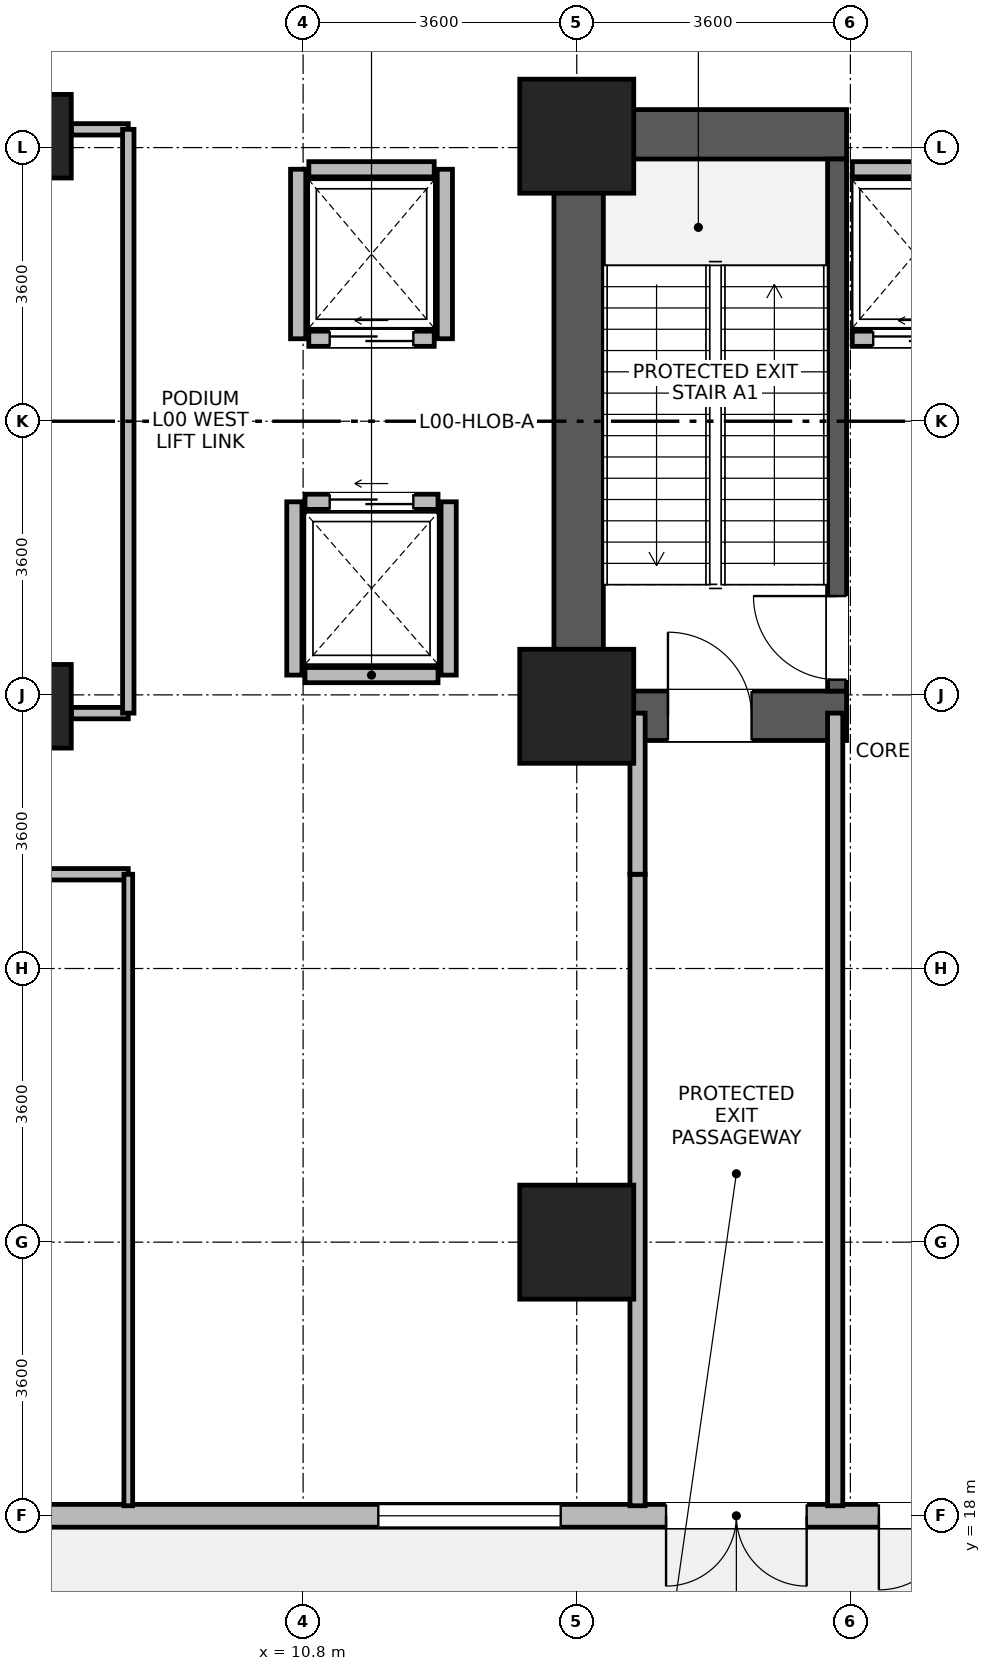
"""IFC4 building model, lengths in metres.
Left out: names, types, materials, properties, quantities, classifications, styles, units other than length and angle.
Written with IfcOpenShell. Run it as: python <this file> out.ifc"""

import sys

from ifc_helpers import new_model, si_unit, direction, frame, frame_2d, origin, origin_2d, place, context, subcontext, project, spatial, rectangle, circle, extrude, source, transform, mapped, element, fill, save


model = new_model("IFC4")
c1 = context("Model", 3, precision=1e-05, world=origin(), true_north=direction((0.0, 1.0)))
c2 = subcontext(c1, "Body", "Model", "MODEL_VIEW")
j1 = project(units=[si_unit("LENGTHUNIT", "METRE"), si_unit("PLANEANGLEUNIT", "RADIAN")], contexts=[c1])
p1 = place(None, origin())
s1 = spatial("IfcSite", under=j1, at=p1, CompositionType="ELEMENT")
p2 = place(p1, origin())
s2 = spatial("IfcBuilding", under=s1, at=p2, CompositionType="ELEMENT")
p3 = place(p2, origin())
s3 = spatial("IfcBuildingStorey", under=s2, at=p3, CompositionType="ELEMENT", Elevation=0.0)
p4 = place(p3, frame((14.425, 28.2, 0.0), z_axis=(0.0, 0.0, 1.0), x_axis=(0.0, 1.0, 0.0)))
e1 = element("IfcWall", 1, at=p4, inside=s3, PredefinedType="SHEAR", context=c2, shape_type="SweptSolid", body=[
    extrude(rectangle(XDim=8.3, YDim=0.65, at=frame_2d((4.15, 0.0))), origin(), (0.0, 0.0, 1.0), 5.12),
])
p5 = place(p3, frame((14.75, 28.525, 0.0), z_axis=(0.0, 0.0, 1.0), x_axis=(1.0, 0.0, 0.0)))
e2 = element("IfcWall", 2, at=p5, inside=s3, PredefinedType="SHEAR", context=c2, shape_type="SweptSolid", body=[
    extrude(rectangle(XDim=3.2, YDim=0.65, at=frame_2d((1.6, 0.0))), origin(), (0.0, 0.0, 1.0), 5.12),
])
p6 = place(p5, frame((0.85, 0.0, 0.0)))
e3 = element("IfcOpeningElement", 3, at=p6, cuts=e2, PredefinedType="OPENING", context=c2, shape_type="SweptSolid", body=[
    extrude(rectangle(XDim=1.1, YDim=2.08, at=frame_2d((0.55, 1.04))), frame((0.0, 0.335, 0.0), z_axis=(0.0, -1.0, 0.0), x_axis=(1.0, 0.0, 0.0)), (0.0, 0.0, 1.0), 0.67),
])
p7 = place(p3, frame((14.75, 36.175, 0.0), z_axis=(0.0, 0.0, 1.0), x_axis=(1.0, 0.0, 0.0)))
e4 = element("IfcWall", 4, at=p7, inside=s3, PredefinedType="SHEAR", context=c2, shape_type="SweptSolid", body=[
    extrude(rectangle(XDim=3.2, YDim=0.65, at=frame_2d((1.6, 0.0))), origin(), (0.0, 0.0, 1.0), 5.12),
])
p8 = place(p3, frame((17.825, 28.85, 0.0), z_axis=(0.0, 0.0, 1.0), x_axis=(0.0, 1.0, 0.0)))
e5 = element("IfcWall", 5, at=p8, inside=s3, PredefinedType="SHEAR", context=c2, shape_type="SweptSolid", body=[
    extrude(rectangle(XDim=7.0, YDim=0.25, at=frame_2d((3.5, 0.0))), origin(), (0.0, 0.0, 1.0), 5.12),
])
p9 = place(p8, frame((0.15, 0.0, 0.0)))
e6 = element("IfcOpeningElement", 6, at=p9, cuts=e5, PredefinedType="OPENING", context=c2, shape_type="SweptSolid", body=[
    extrude(rectangle(XDim=1.1, YDim=2.08, at=frame_2d((0.55, 1.04))), frame((0.0, 0.135, 0.0), z_axis=(0.0, -1.0, 0.0), x_axis=(1.0, 0.0, 0.0)), (0.0, 0.0, 1.0), 0.27),
])
m1 = source(origin(), c2, "Body", "SweptSolid", [
    extrude(circle(Radius=0.55, at=origin_2d()), origin(), (0.0, 0.0, 1.0), 5.4),
])
for number, where, z_axis, x_axis in (
    (7, (7.2, 28.65, 0.0), (0.0, 0.0, 1.0), (1.0, 0.0, 0.0)),
    (8, (7.2, 36.15, 0.0), (0.0, 0.0, 1.0), (1.0, 0.0, 0.0)),
):
    element("IfcColumn", number, at=place(p3, frame(where, z_axis=z_axis, x_axis=x_axis)), inside=s3, PredefinedType="COLUMN", context=c2, shape_type="MappedRepresentation", body=[
        mapped(m1, transform((0.0, 0.0, 0.0), x_axis=(1.0, 0.0, 0.0), y_axis=(0.0, 1.0, 0.0), z_axis=(0.0, 0.0, 1.0), scale=1.0)),
    ])
m2 = source(origin(), c2, "Body", "SweptSolid", [
    extrude(rectangle(XDim=1.5, YDim=1.5, at=origin_2d()), origin(), (0.0, 0.0, 1.0), 5.4),
])
for number, where, z_axis, x_axis in (
    (9, (14.4, 21.6, 0.0), (0.0, 0.0, 1.0), (1.0, 0.0, 0.0)),
    (10, (14.4, 28.65, 0.0), (0.0, 0.0, 1.0), (1.0, 0.0, 0.0)),
    (11, (14.4, 36.15, 0.0), (0.0, 0.0, 1.0), (1.0, 0.0, 0.0)),
):
    element("IfcColumn", number, at=place(p3, frame(where, z_axis=z_axis, x_axis=x_axis)), inside=s3, PredefinedType="COLUMN", context=c2, shape_type="MappedRepresentation", body=[
        mapped(m2, transform((0.0, 0.0, 0.0), x_axis=(1.0, 0.0, 0.0), y_axis=(0.0, 1.0, 0.0), z_axis=(0.0, 0.0, 1.0), scale=1.0)),
    ])
p10 = place(p3, frame((21.445, 18.0, 0.0), z_axis=(0.0, 0.0, 1.0), x_axis=(-1.0, 0.0, 0.0)))
e12 = element("IfcWall", 12, at=p10, inside=s3, PredefinedType="STANDARD", context=c2, shape_type="SweptSolid", body=[
    extrude(rectangle(XDim=20.294, YDim=0.3, at=frame_2d((10.147, 0.0))), origin(), (0.0, 0.0, 1.0), 5.1),
])
p11 = place(p10, frame((4.02, 0.0, 0.0)))
e13 = element("IfcOpeningElement", 13, at=p11, cuts=e12, PredefinedType="OPENING", context=c2, shape_type="SweptSolid", body=[
    extrude(rectangle(XDim=1.85, YDim=2.25, at=frame_2d((0.925, 1.125))), frame((0.0, 0.16, 0.0), z_axis=(0.0, -1.0, 0.0), x_axis=(1.0, 0.0, 0.0)), (0.0, 0.0, 1.0), 0.32),
])
p12 = place(p10, frame((1.12, 0.0, 0.0)))
e14 = element("IfcOpeningElement", 14, at=p12, cuts=e12, PredefinedType="OPENING", context=c2, shape_type="SweptSolid", body=[
    extrude(rectangle(XDim=1.95, YDim=2.4, at=frame_2d((0.975, 1.2))), frame((0.0, 0.16, 0.0), z_axis=(0.0, -1.0, 0.0), x_axis=(1.0, 0.0, 0.0)), (0.0, 0.0, 1.0), 0.32),
])
p13 = place(p10, frame((7.256, 0.0, 0.9)))
e15 = element("IfcOpeningElement", 15, at=p13, cuts=e12, PredefinedType="OPENING", context=c2, shape_type="SweptSolid", body=[
    extrude(rectangle(XDim=2.4, YDim=2.5, at=frame_2d((1.2, 1.25))), frame((0.0, 0.16, 0.0), z_axis=(0.0, -1.0, 0.0), x_axis=(1.0, 0.0, 0.0)), (0.0, 0.0, 1.0), 0.32),
])
p14 = place(p10, frame((14.021, 0.0, 0.9)))
e16 = element("IfcOpeningElement", 16, at=p14, cuts=e12, PredefinedType="OPENING", context=c2, shape_type="SweptSolid", body=[
    extrude(rectangle(XDim=2.4, YDim=2.5, at=frame_2d((1.2, 1.25))), frame((0.0, 0.16, 0.0), z_axis=(0.0, -1.0, 0.0), x_axis=(1.0, 0.0, 0.0)), (0.0, 0.0, 1.0), 0.32),
])
p15 = place(p10, frame((17.403, 0.0, 0.9)))
e17 = element("IfcOpeningElement", 17, at=p15, cuts=e12, PredefinedType="OPENING", context=c2, shape_type="SweptSolid", body=[
    extrude(rectangle(XDim=2.4, YDim=2.5, at=frame_2d((1.2, 1.25))), frame((0.0, 0.16, 0.0), z_axis=(0.0, -1.0, 0.0), x_axis=(1.0, 0.0, 0.0)), (0.0, 0.0, 1.0), 0.32),
])
p16 = place(p3, frame((18.025, 33.485, 0.0), z_axis=(0.0, 0.0, 1.0), x_axis=(1.0, 0.0, 0.0)))
e18 = element("IfcWall", 18, at=p16, inside=s3, PredefinedType="PARTITIONING", context=c2, shape_type="SweptSolid", body=[
    extrude(rectangle(XDim=1.65, YDim=0.2, at=frame_2d((0.825, 0.0))), origin(), (0.0, 0.0, 1.0), 5.1),
])
p17 = place(p16, frame((0.275, 0.0, 0.0)))
e19 = element("IfcOpeningElement", 19, at=p17, cuts=e18, PredefinedType="OPENING", context=c2, shape_type="SweptSolid", body=[
    extrude(rectangle(XDim=1.1, YDim=2.12, at=frame_2d((0.55, 1.06))), frame((0.0, 0.11, 0.0), z_axis=(0.0, -1.0, 0.0), x_axis=(1.0, 0.0, 0.0)), (0.0, 0.0, 1.0), 0.22),
])
p18 = place(p3, frame((18.025, 35.715, 0.0), z_axis=(0.0, 0.0, 1.0), x_axis=(1.0, 0.0, 0.0)))
e20 = element("IfcWall", 20, at=p18, inside=s3, PredefinedType="PARTITIONING", context=c2, shape_type="SweptSolid", body=[
    extrude(rectangle(XDim=1.65, YDim=0.2, at=frame_2d((0.825, 0.0))), origin(), (0.0, 0.0, 1.0), 5.1),
])
p19 = place(p3, frame((10.825, 29.06, 0.0), z_axis=(0.0, 0.0, 1.0), x_axis=(1.0, 0.0, 0.0)))
e21 = element("IfcWall", 21, at=p19, inside=s3, PredefinedType="PARTITIONING", context=c2, shape_type="SweptSolid", body=[
    extrude(rectangle(XDim=1.75, YDim=0.2, at=frame_2d((0.875, 0.0))), origin(), (0.0, 0.0, 1.0), 5.1),
])
p20 = place(p3, frame((10.825, 31.34, 0.0), z_axis=(0.0, 0.0, 1.0), x_axis=(1.0, 0.0, 0.0)))
e22 = element("IfcWall", 22, at=p20, inside=s3, PredefinedType="PARTITIONING", context=c2, shape_type="SweptSolid", body=[
    extrude(rectangle(XDim=1.75, YDim=0.2, at=frame_2d((0.875, 0.0))), origin(), (0.0, 0.0, 1.0), 5.1),
])
p21 = place(p20, frame((0.325, 0.0, 0.0)))
e23 = element("IfcOpeningElement", 23, at=p21, cuts=e22, PredefinedType="OPENING", context=c2, shape_type="SweptSolid", body=[
    extrude(rectangle(XDim=1.1, YDim=2.12, at=frame_2d((0.55, 1.06))), frame((0.0, 0.11, 0.0), z_axis=(0.0, -1.0, 0.0), x_axis=(1.0, 0.0, 0.0)), (0.0, 0.0, 1.0), 0.22),
])
for number, where, z_axis, x_axis in (
    (24, (10.685, 29.06, 0.0), (0.0, 0.0, 1.0), (0.0, 1.0, 0.0)),
    (25, (12.715, 29.06, 0.0), (0.0, 0.0, 1.0), (0.0, 1.0, 0.0)),
):
    element("IfcWall", number, at=place(p3, frame(where, z_axis=z_axis, x_axis=x_axis)), inside=s3, PredefinedType="PARTITIONING", context=c2, shape_type="SweptSolid", body=[
        extrude(rectangle(XDim=2.28, YDim=0.2, at=frame_2d((1.14, 0.0))), origin(), (0.0, 0.0, 1.0), 5.1),
    ])
p22 = place(p3, frame((10.875, 33.485, 0.0), z_axis=(0.0, 0.0, 1.0), x_axis=(1.0, 0.0, 0.0)))
e26 = element("IfcWall", 26, at=p22, inside=s3, PredefinedType="PARTITIONING", context=c2, shape_type="SweptSolid", body=[
    extrude(rectangle(XDim=1.65, YDim=0.2, at=frame_2d((0.825, 0.0))), origin(), (0.0, 0.0, 1.0), 5.1),
])
p23 = place(p22, frame((0.275, 0.0, 0.0)))
e27 = element("IfcOpeningElement", 27, at=p23, cuts=e26, PredefinedType="OPENING", context=c2, shape_type="SweptSolid", body=[
    extrude(rectangle(XDim=1.1, YDim=2.12, at=frame_2d((0.55, 1.06))), frame((0.0, 0.11, 0.0), z_axis=(0.0, -1.0, 0.0), x_axis=(1.0, 0.0, 0.0)), (0.0, 0.0, 1.0), 0.22),
])
p24 = place(p3, frame((10.875, 35.715, 0.0), z_axis=(0.0, 0.0, 1.0), x_axis=(1.0, 0.0, 0.0)))
e28 = element("IfcWall", 28, at=p24, inside=s3, PredefinedType="PARTITIONING", context=c2, shape_type="SweptSolid", body=[
    extrude(rectangle(XDim=1.65, YDim=0.2, at=frame_2d((0.825, 0.0))), origin(), (0.0, 0.0, 1.0), 5.1),
])
for number, where, z_axis, x_axis in (
    (29, (10.735, 33.485, 0.0), (0.0, 0.0, 1.0), (0.0, 1.0, 0.0)),
    (30, (12.665, 33.485, 0.0), (0.0, 0.0, 1.0), (0.0, 1.0, 0.0)),
):
    element("IfcWall", number, at=place(p3, frame(where, z_axis=z_axis, x_axis=x_axis)), inside=s3, PredefinedType="PARTITIONING", context=c2, shape_type="SweptSolid", body=[
        extrude(rectangle(XDim=2.23, YDim=0.2, at=frame_2d((1.115, 0.0))), origin(), (0.0, 0.0, 1.0), 5.1),
    ])
p25 = place(p3, frame((17.8, 18.132, 0.0), z_axis=(0.0, 0.0, 1.0), x_axis=(0.0, 1.0, 0.0)))
e31 = element("IfcWall", 31, at=p25, inside=s3, PredefinedType="PARTITIONING", context=c2, shape_type="SweptSolid", body=[
    extrude(rectangle(XDim=10.428, YDim=0.2, at=frame_2d((5.214, 0.0))), origin(), (0.0, 0.0, 1.0), 5.1),
])
p26 = place(p3, frame((15.2, 18.132, 0.0), z_axis=(0.0, 0.0, 1.0), x_axis=(0.0, 1.0, 0.0)))
e32 = element("IfcWall", 32, at=p26, inside=s3, PredefinedType="PARTITIONING", context=c2, shape_type="SweptSolid", body=[
    extrude(rectangle(XDim=8.308, YDim=0.2, at=frame_2d((4.154, 0.0))), origin(), (0.0, 0.0, 1.0), 5.1),
])
p27 = place(p3, frame((15.2, 26.44, 0.0), z_axis=(0.0, 0.0, 1.0), x_axis=(0.0, 1.0, 0.0)))
e33 = element("IfcWall", 33, at=p27, inside=s3, PredefinedType="PARTITIONING", context=c2, shape_type="SweptSolid", body=[
    extrude(rectangle(XDim=2.12, YDim=0.2, at=frame_2d((1.06, 0.0))), origin(), (0.0, 0.0, 1.0), 5.1),
])
p28 = place(p3, frame((-11.868, 26.44, 0.0), z_axis=(0.0, 0.0, 1.0), x_axis=(1.0, 0.0, 0.0)))
e34 = element("IfcWall", 34, at=p28, inside=s3, PredefinedType="PARTITIONING", context=c2, shape_type="SweptSolid", body=[
    extrude(rectangle(XDim=20.368, YDim=0.15, at=frame_2d((10.184, 0.0))), origin(), (0.0, 0.0, 1.0), 5.1),
])
p29 = place(p28, frame((9.534, 0.0, 0.0)))
e35 = element("IfcOpeningElement", 35, at=p29, cuts=e34, PredefinedType="OPENING", context=c2, shape_type="SweptSolid", body=[
    extrude(rectangle(XDim=1.3, YDim=2.12, at=frame_2d((0.65, 1.06))), frame((0.0, 0.085, 0.0), z_axis=(0.0, -1.0, 0.0), x_axis=(1.0, 0.0, 0.0)), (0.0, 0.0, 1.0), 0.17),
])
for number, where, z_axis, x_axis in (
    (36, (7.75, 28.56, 0.0), (0.0, 0.0, 1.0), (1.0, 0.0, 0.0)),
    (37, (7.75, 36.24, 0.0), (0.0, 0.0, 1.0), (1.0, 0.0, 0.0)),
):
    element("IfcWall", number, at=place(p3, frame(where, z_axis=z_axis, x_axis=x_axis)), inside=s3, PredefinedType="PARTITIONING", context=c2, shape_type="SweptSolid", body=[
        extrude(rectangle(XDim=0.75, YDim=0.15, at=frame_2d((0.375, 0.0))), origin(), (0.0, 0.0, 1.0), 4.4),
    ])
p30 = place(p3, frame((8.5, 28.56, 0.0), z_axis=(0.0, 0.0, 1.0), x_axis=(0.0, 1.0, 0.0)))
e38 = element("IfcWall", 38, at=p30, inside=s3, PredefinedType="PARTITIONING", context=c2, shape_type="SweptSolid", body=[
    extrude(rectangle(XDim=7.68, YDim=0.15, at=frame_2d((3.84, 0.0))), origin(), (0.0, 0.0, 1.0), 5.1),
])
p31 = place(p3, frame((8.5, 18.132, 0.0), z_axis=(0.0, 0.0, 1.0), x_axis=(0.0, 1.0, 0.0)))
e39 = element("IfcWall", 39, at=p31, inside=s3, PredefinedType="PARTITIONING", context=c2, shape_type="SweptSolid", body=[
    extrude(rectangle(XDim=8.308, YDim=0.115, at=frame_2d((4.154, 0.0))), origin(), (0.0, 0.0, 1.0), 5.1),
])
p32 = place(p11, origin())
e40 = element("IfcDoor", 40, at=p32, inside=s3, OperationType="DOUBLE_DOOR_SINGLE_SWING", PredefinedType="DOOR", context=c2, shape_type="SweptSolid", body=[
    extrude(rectangle(XDim=1.85, YDim=2.25, at=frame_2d((0.925, 1.125))), frame((0.0, 0.025, 0.0), z_axis=(0.0, -1.0, 0.0), x_axis=(1.0, 0.0, 0.0)), (0.0, 0.0, 1.0), 0.05),
])
fill(e13, e40)
p33 = place(p12, origin())
e41 = element("IfcDoor", 41, at=p33, inside=s3, OperationType="DOUBLE_DOOR_SINGLE_SWING", PredefinedType="DOOR", context=c2, shape_type="SweptSolid", body=[
    extrude(rectangle(XDim=1.95, YDim=2.4, at=frame_2d((0.975, 1.2))), frame((0.0, 0.025, 0.0), z_axis=(0.0, -1.0, 0.0), x_axis=(1.0, 0.0, 0.0)), (0.0, 0.0, 1.0), 0.05),
])
fill(e14, e41)
p34 = place(p13, origin())
e42 = element("IfcWindow", 42, at=p34, inside=s3, PartitioningType="SINGLE_PANEL", PredefinedType="WINDOW", context=c2, shape_type="SweptSolid", body=[
    extrude(rectangle(XDim=2.4, YDim=2.5, at=frame_2d((1.2, 1.25))), frame((0.0, 0.03, 0.0), z_axis=(0.0, -1.0, 0.0), x_axis=(1.0, 0.0, 0.0)), (0.0, 0.0, 1.0), 0.06),
])
fill(e15, e42)
p35 = place(p9, origin())
e43 = element("IfcDoor", 43, at=p35, inside=s3, OperationType="SINGLE_SWING_RIGHT", PredefinedType="DOOR", context=c2, shape_type="SweptSolid", body=[
    extrude(rectangle(XDim=1.1, YDim=2.08, at=frame_2d((0.55, 1.04))), frame((0.0, 0.025, 0.0), z_axis=(0.0, -1.0, 0.0), x_axis=(1.0, 0.0, 0.0)), (0.0, 0.0, 1.0), 0.05),
])
fill(e6, e43)
p36 = place(p6, origin())
e44 = element("IfcDoor", 44, at=p36, inside=s3, OperationType="SINGLE_SWING_LEFT", PredefinedType="DOOR", context=c2, shape_type="SweptSolid", body=[
    extrude(rectangle(XDim=1.1, YDim=2.08, at=frame_2d((0.55, 1.04))), frame((0.0, 0.025, 0.0), z_axis=(0.0, -1.0, 0.0), x_axis=(1.0, 0.0, 0.0)), (0.0, 0.0, 1.0), 0.05),
])
fill(e3, e44)
p37 = place(p17, origin())
e45 = element("IfcDoor", 45, at=p37, inside=s3, OperationType="SLIDING_TO_LEFT", PredefinedType="DOOR", context=c2, shape_type="SweptSolid", body=[
    extrude(rectangle(XDim=1.1, YDim=2.12, at=frame_2d((0.55, 1.06))), frame((0.0, 0.025, 0.0), z_axis=(0.0, -1.0, 0.0), x_axis=(1.0, 0.0, 0.0)), (0.0, 0.0, 1.0), 0.05),
])
fill(e19, e45)
p38 = place(p21, origin())
e46 = element("IfcDoor", 46, at=p38, inside=s3, OperationType="SLIDING_TO_LEFT", PredefinedType="DOOR", context=c2, shape_type="SweptSolid", body=[
    extrude(rectangle(XDim=1.1, YDim=2.12, at=frame_2d((0.55, 1.06))), frame((0.0, 0.025, 0.0), z_axis=(0.0, -1.0, 0.0), x_axis=(1.0, 0.0, 0.0)), (0.0, 0.0, 1.0), 0.05),
])
fill(e23, e46)
p39 = place(p23, origin())
e47 = element("IfcDoor", 47, at=p39, inside=s3, OperationType="SLIDING_TO_LEFT", PredefinedType="DOOR", context=c2, shape_type="SweptSolid", body=[
    extrude(rectangle(XDim=1.1, YDim=2.12, at=frame_2d((0.55, 1.06))), frame((0.0, 0.025, 0.0), z_axis=(0.0, -1.0, 0.0), x_axis=(1.0, 0.0, 0.0)), (0.0, 0.0, 1.0), 0.05),
])
fill(e27, e47)
save(model, sys.argv[1])
